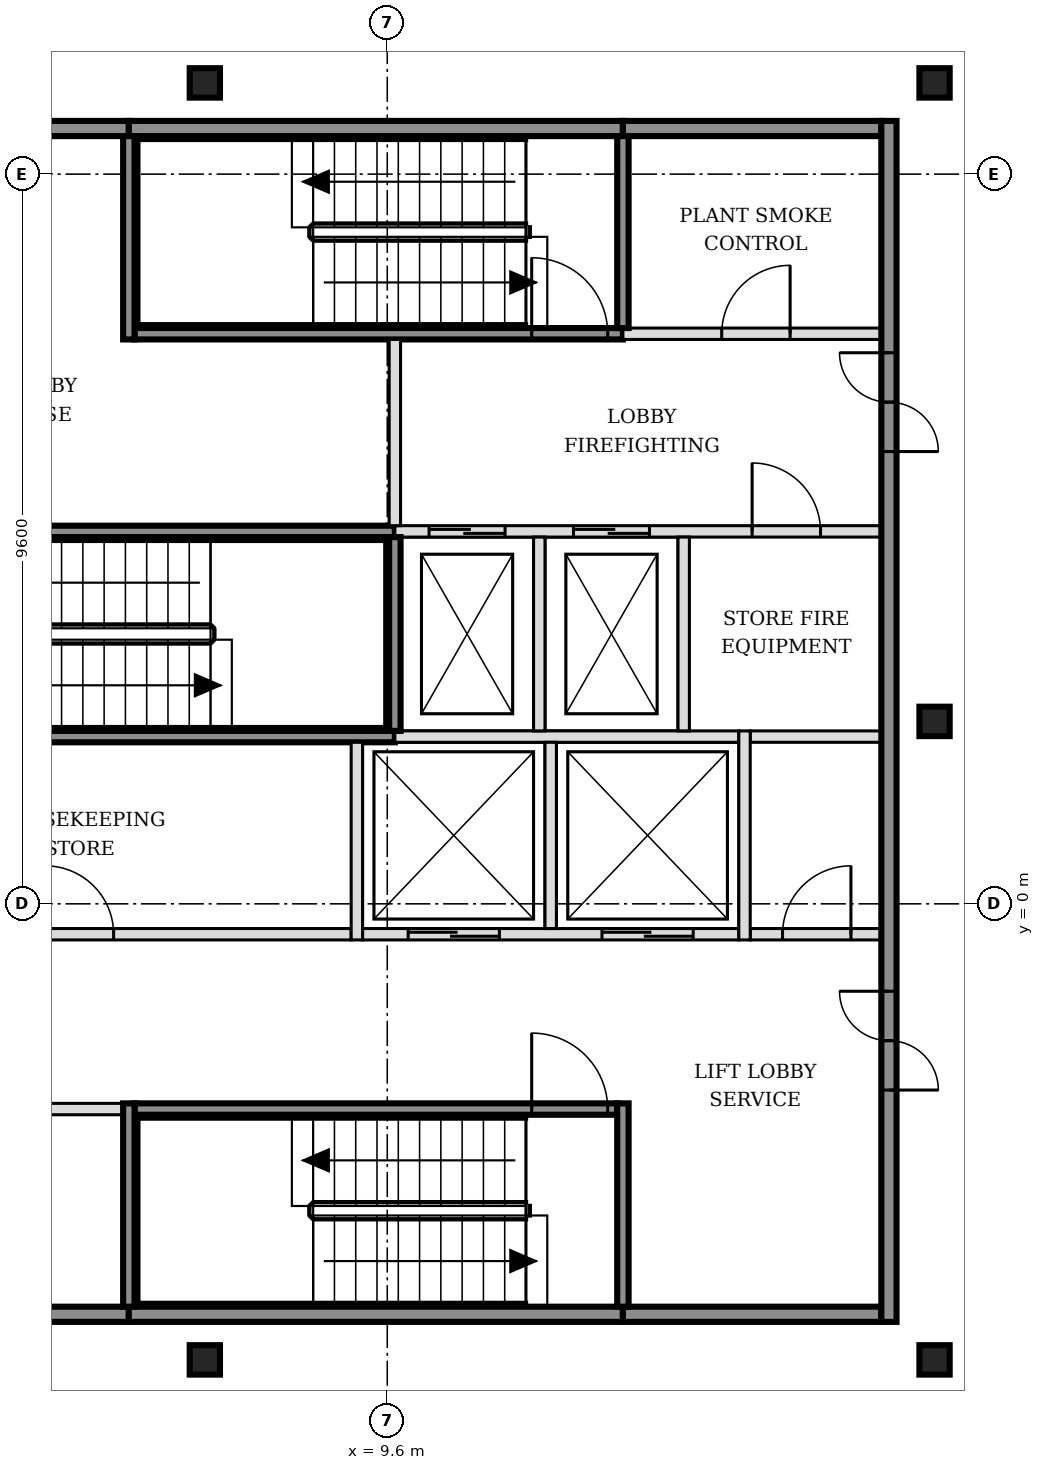
"""IFC4 building model, lengths in metres.
Left out: names, types, materials, properties, quantities, classifications, styles, units other than length and angle.
Written with IfcOpenShell. Run it as: python <this file> out.ifc"""

import sys

from ifc_helpers import new_model, si_unit, direction, frame, frame_2d, origin, origin_2d, place, context, subcontext, project, spatial, rectangle, i_section, extrude, element, fill, save


model = new_model("IFC4")
c1 = context("Model", 3, precision=1e-05, world=origin(), true_north=direction((0.0, 1.0)))
c2 = subcontext(c1, "Body", "Model", "MODEL_VIEW")
j1 = project(units=[si_unit("LENGTHUNIT", "METRE"), si_unit("PLANEANGLEUNIT", "RADIAN")], contexts=[c1])
p1 = place(None, origin())
s1 = spatial("IfcSite", under=j1, at=p1, CompositionType="ELEMENT")
p2 = place(p1, origin())
s2 = spatial("IfcBuilding", under=s1, at=p2, CompositionType="ELEMENT")
p3 = place(p2, frame((0.0, 0.0, 257.4)))
s3 = spatial("IfcBuildingStorey", under=s2, at=p3, CompositionType="ELEMENT", Elevation=257.4)
for number, where, z_axis, x_axis in (
    (1, (7.2, -6.0, -0.15), (0.0, 0.0, 1.0), (1.0, 0.0, 0.0)),
    (2, (16.8, -6.0, -0.15), (0.0, 0.0, 1.0), (1.0, 0.0, 0.0)),
    (3, (16.8, 2.4, -0.15), (0.0, 0.0, 1.0), (1.0, 0.0, 0.0)),
    (4, (7.2, 10.8, -0.15), (0.0, 0.0, 1.0), (1.0, 0.0, 0.0)),
    (5, (16.8, 10.8, -0.15), (0.0, 0.0, 1.0), (1.0, 0.0, 0.0)),
):
    element("IfcColumn", number, at=place(p3, frame(where, z_axis=z_axis, x_axis=x_axis)), inside=s3, PredefinedType="COLUMN", context=c2, shape_type="SweptSolid", body=[
        extrude(i_section(OverallWidth=0.398, OverallDepth=0.387, WebThickness=0.021, FlangeThickness=0.033, FilletRadius=0.015, at=origin_2d()), origin(), (0.0, 0.0, 1.0), 3.5),
    ])
p4 = place(p3, frame((-1.7, -5.4, 0.0), z_axis=(0.0, 0.0, 1.0), x_axis=(1.0, 0.0, 0.0)))
e6 = element("IfcWall", 6, at=p4, inside=s3, PredefinedType="SOLIDWALL", context=c2, shape_type="SweptSolid", body=[
    extrude(rectangle(XDim=7.9, YDim=0.2, at=frame_2d((3.95, 0.0))), origin(), (0.0, 0.0, 1.0), 3.35),
])
p5 = place(p3, frame((6.2, -5.4, 0.0), z_axis=(0.0, 0.0, 1.0), x_axis=(1.0, 0.0, 0.0)))
e7 = element("IfcWall", 7, at=p5, inside=s3, PredefinedType="SOLIDWALL", context=c2, shape_type="SweptSolid", body=[
    extrude(rectangle(XDim=6.5, YDim=0.2, at=frame_2d((3.25, 0.0))), origin(), (0.0, 0.0, 1.0), 3.35),
])
p6 = place(p3, frame((12.7, -5.4, 0.0), z_axis=(0.0, 0.0, 1.0), x_axis=(1.0, 0.0, 0.0)))
e8 = element("IfcWall", 8, at=p6, inside=s3, PredefinedType="SOLIDWALL", context=c2, shape_type="SweptSolid", body=[
    extrude(rectangle(XDim=3.4, YDim=0.2, at=frame_2d((1.7, 0.0))), origin(), (0.0, 0.0, 1.0), 3.35),
])
p7 = place(p3, frame((-1.7, -2.7, 0.0), z_axis=(0.0, 0.0, 1.0), x_axis=(1.0, 0.0, 0.0)))
e9 = element("IfcWall", 9, at=p7, inside=s3, PredefinedType="PARTITIONING", context=c2, shape_type="SweptSolid", body=[
    extrude(rectangle(XDim=7.825, YDim=0.15, at=frame_2d((3.913, 0.0))), origin(), (0.0, 0.0, 1.0), 3.35),
])
p8 = place(p7, frame((3.45, 0.0, 0.0)))
e10 = element("IfcOpeningElement", 10, at=p8, cuts=e9, PredefinedType="OPENING", context=c2, shape_type="SweptSolid", body=[
    extrude(rectangle(XDim=0.9, YDim=2.1, at=frame_2d((0.45, 1.05))), frame((0.0, 0.085, 0.0), z_axis=(0.0, -1.0, 0.0), x_axis=(1.0, 0.0, 0.0)), (0.0, 0.0, 1.0), 0.17),
])
p9 = place(p3, frame((6.275, -2.7, 0.0), z_axis=(0.0, 0.0, 1.0), x_axis=(1.0, 0.0, 0.0)))
e11 = element("IfcWall", 11, at=p9, inside=s3, PredefinedType="SOLIDWALL", context=c2, shape_type="SweptSolid", body=[
    extrude(rectangle(XDim=6.35, YDim=0.15, at=frame_2d((3.175, 0.0))), origin(), (0.0, 0.0, 1.0), 3.35),
])
p10 = place(p9, frame((5.225, 0.0, 0.0)))
e12 = element("IfcOpeningElement", 12, at=p10, cuts=e11, PredefinedType="OPENING", context=c2, shape_type="SweptSolid", body=[
    extrude(rectangle(XDim=1.0, YDim=2.1, at=frame_2d((0.5, 1.05))), frame((0.0, 0.085, 0.0), z_axis=(0.0, -1.0, 0.0), x_axis=(1.0, 0.0, 0.0)), (0.0, 0.0, 1.0), 0.17),
])
p11 = place(p3, frame((-1.7, -0.4, 0.0), z_axis=(0.0, 0.0, 1.0), x_axis=(1.0, 0.0, 0.0)))
e13 = element("IfcWall", 13, at=p11, inside=s3, PredefinedType="PARTITIONING", context=c2, shape_type="SweptSolid", body=[
    extrude(rectangle(XDim=10.825, YDim=0.15, at=frame_2d((5.413, 0.0))), origin(), (0.0, 0.0, 1.0), 3.35),
])
p12 = place(p11, frame((1.3, 0.0, 0.0)))
e14 = element("IfcOpeningElement", 14, at=p12, cuts=e13, PredefinedType="OPENING", context=c2, shape_type="SweptSolid", body=[
    extrude(rectangle(XDim=0.9, YDim=2.1, at=frame_2d((0.45, 1.05))), frame((0.0, 0.085, 0.0), z_axis=(0.0, -1.0, 0.0), x_axis=(1.0, 0.0, 0.0)), (0.0, 0.0, 1.0), 0.17),
])
p13 = place(p11, frame((6.8, 0.0, 0.0)))
e15 = element("IfcOpeningElement", 15, at=p13, cuts=e13, PredefinedType="OPENING", context=c2, shape_type="SweptSolid", body=[
    extrude(rectangle(XDim=0.9, YDim=2.1, at=frame_2d((0.45, 1.05))), frame((0.0, 0.085, 0.0), z_axis=(0.0, -1.0, 0.0), x_axis=(1.0, 0.0, 0.0)), (0.0, 0.0, 1.0), 0.17),
])
p14 = place(p3, frame((9.275, -0.4, 0.0), z_axis=(0.0, 0.0, 1.0), x_axis=(1.0, 0.0, 0.0)))
e16 = element("IfcWall", 16, at=p14, inside=s3, PredefinedType="SOLIDWALL", context=c2, shape_type="SweptSolid", body=[
    extrude(rectangle(XDim=4.95, YDim=0.15, at=frame_2d((2.475, 0.0))), origin(), (0.0, 0.0, 1.0), 3.35),
])
p15 = place(p14, frame((0.6, 0.0, 0.0)))
e17 = element("IfcOpeningElement", 17, at=p15, cuts=e16, PredefinedType="OPENING", context=c2, shape_type="SweptSolid", body=[
    extrude(rectangle(XDim=1.2, YDim=2.1, at=frame_2d((0.6, 1.05))), frame((0.0, 0.085, 0.0), z_axis=(0.0, -1.0, 0.0), x_axis=(1.0, 0.0, 0.0)), (0.0, 0.0, 1.0), 0.17),
])
p16 = place(p14, frame((3.15, 0.0, 0.0)))
e18 = element("IfcOpeningElement", 18, at=p16, cuts=e16, PredefinedType="OPENING", context=c2, shape_type="SweptSolid", body=[
    extrude(rectangle(XDim=1.2, YDim=2.1, at=frame_2d((0.6, 1.05))), frame((0.0, 0.085, 0.0), z_axis=(0.0, -1.0, 0.0), x_axis=(1.0, 0.0, 0.0)), (0.0, 0.0, 1.0), 0.17),
])
p17 = place(p3, frame((14.375, -0.4, 0.0), z_axis=(0.0, 0.0, 1.0), x_axis=(1.0, 0.0, 0.0)))
e19 = element("IfcWall", 19, at=p17, inside=s3, PredefinedType="PARTITIONING", context=c2, shape_type="SweptSolid", body=[
    extrude(rectangle(XDim=1.725, YDim=0.15, at=frame_2d((0.863, 0.0))), origin(), (0.0, 0.0, 1.0), 3.35),
])
p18 = place(p17, frame((0.425, 0.0, 0.0)))
e20 = element("IfcOpeningElement", 20, at=p18, cuts=e19, PredefinedType="OPENING", context=c2, shape_type="SweptSolid", body=[
    extrude(rectangle(XDim=0.9, YDim=2.1, at=frame_2d((0.45, 1.05))), frame((0.0, 0.085, 0.0), z_axis=(0.0, -1.0, 0.0), x_axis=(1.0, 0.0, 0.0)), (0.0, 0.0, 1.0), 0.17),
])
p19 = place(p3, frame((3.2, 2.2, 0.0), z_axis=(0.0, 0.0, 1.0), x_axis=(1.0, 0.0, 0.0)))
e21 = element("IfcWall", 21, at=p19, inside=s3, PredefinedType="SOLIDWALL", context=c2, shape_type="SweptSolid", body=[
    extrude(rectangle(XDim=6.5, YDim=0.15, at=frame_2d((3.25, 0.0))), origin(), (0.0, 0.0, 1.0), 3.35),
])
p20 = place(p3, frame((9.7, 2.2, 0.0), z_axis=(0.0, 0.0, 1.0), x_axis=(1.0, 0.0, 0.0)))
e22 = element("IfcWall", 22, at=p20, inside=s3, PredefinedType="SOLIDWALL", context=c2, shape_type="SweptSolid", body=[
    extrude(rectangle(XDim=4.525, YDim=0.15, at=frame_2d((2.263, 0.0))), origin(), (0.0, 0.0, 1.0), 3.35),
])
p21 = place(p3, frame((14.375, 2.2, 0.0), z_axis=(0.0, 0.0, 1.0), x_axis=(1.0, 0.0, 0.0)))
e23 = element("IfcWall", 23, at=p21, inside=s3, PredefinedType="PARTITIONING", context=c2, shape_type="SweptSolid", body=[
    extrude(rectangle(XDim=1.725, YDim=0.15, at=frame_2d((0.863, 0.0))), origin(), (0.0, 0.0, 1.0), 3.35),
])
p22 = place(p3, frame((3.2, 4.9, 0.0), z_axis=(0.0, 0.0, 1.0), x_axis=(1.0, 0.0, 0.0)))
e24 = element("IfcWall", 24, at=p22, inside=s3, PredefinedType="SOLIDWALL", context=c2, shape_type="SweptSolid", body=[
    extrude(rectangle(XDim=6.5, YDim=0.15, at=frame_2d((3.25, 0.0))), origin(), (0.0, 0.0, 1.0), 3.35),
])
p23 = place(p22, frame((0.175, 0.0, 0.0)))
e25 = element("IfcOpeningElement", 25, at=p23, cuts=e24, PredefinedType="OPENING", context=c2, shape_type="SweptSolid", body=[
    extrude(rectangle(XDim=1.0, YDim=2.1, at=frame_2d((0.5, 1.05))), frame((0.0, 0.085, 0.0), z_axis=(0.0, -1.0, 0.0), x_axis=(1.0, 0.0, 0.0)), (0.0, 0.0, 1.0), 0.17),
])
p24 = place(p3, frame((9.7, 4.9, 0.0), z_axis=(0.0, 0.0, 1.0), x_axis=(1.0, 0.0, 0.0)))
e26 = element("IfcWall", 26, at=p24, inside=s3, PredefinedType="SOLIDWALL", context=c2, shape_type="SweptSolid", body=[
    extrude(rectangle(XDim=6.4, YDim=0.15, at=frame_2d((3.2, 0.0))), origin(), (0.0, 0.0, 1.0), 3.35),
])
p25 = place(p24, frame((0.45, 0.0, 0.0)))
e27 = element("IfcOpeningElement", 27, at=p25, cuts=e26, PredefinedType="OPENING", context=c2, shape_type="SweptSolid", body=[
    extrude(rectangle(XDim=1.0, YDim=2.1, at=frame_2d((0.5, 1.05))), frame((0.0, 0.085, 0.0), z_axis=(0.0, -1.0, 0.0), x_axis=(1.0, 0.0, 0.0)), (0.0, 0.0, 1.0), 0.17),
])
p26 = place(p24, frame((2.35, 0.0, 0.0)))
e28 = element("IfcOpeningElement", 28, at=p26, cuts=e26, PredefinedType="OPENING", context=c2, shape_type="SweptSolid", body=[
    extrude(rectangle(XDim=1.0, YDim=2.1, at=frame_2d((0.5, 1.05))), frame((0.0, 0.085, 0.0), z_axis=(0.0, -1.0, 0.0), x_axis=(1.0, 0.0, 0.0)), (0.0, 0.0, 1.0), 0.17),
])
p27 = place(p24, frame((4.7, 0.0, 0.0)))
e29 = element("IfcOpeningElement", 29, at=p27, cuts=e26, PredefinedType="OPENING", context=c2, shape_type="SweptSolid", body=[
    extrude(rectangle(XDim=0.9, YDim=2.1, at=frame_2d((0.45, 1.05))), frame((0.0, 0.085, 0.0), z_axis=(0.0, -1.0, 0.0), x_axis=(1.0, 0.0, 0.0)), (0.0, 0.0, 1.0), 0.17),
])
p28 = place(p3, frame((6.275, 7.5, 0.0), z_axis=(0.0, 0.0, 1.0), x_axis=(1.0, 0.0, 0.0)))
e30 = element("IfcWall", 30, at=p28, inside=s3, PredefinedType="SOLIDWALL", context=c2, shape_type="SweptSolid", body=[
    extrude(rectangle(XDim=6.425, YDim=0.15, at=frame_2d((3.212, 0.0))), origin(), (0.0, 0.0, 1.0), 3.35),
])
p29 = place(p28, frame((5.225, 0.0, 0.0)))
e31 = element("IfcOpeningElement", 31, at=p29, cuts=e30, PredefinedType="OPENING", context=c2, shape_type="SweptSolid", body=[
    extrude(rectangle(XDim=1.0, YDim=2.1, at=frame_2d((0.5, 1.05))), frame((0.0, 0.085, 0.0), z_axis=(0.0, -1.0, 0.0), x_axis=(1.0, 0.0, 0.0)), (0.0, 0.0, 1.0), 0.17),
])
p30 = place(p3, frame((12.7, 7.5, 0.0), z_axis=(0.0, 0.0, 1.0), x_axis=(1.0, 0.0, 0.0)))
e32 = element("IfcWall", 32, at=p30, inside=s3, PredefinedType="SOLIDWALL", context=c2, shape_type="SweptSolid", body=[
    extrude(rectangle(XDim=3.4, YDim=0.15, at=frame_2d((1.7, 0.0))), origin(), (0.0, 0.0, 1.0), 3.35),
])
p31 = place(p30, frame((1.3, 0.0, 0.0)))
e33 = element("IfcOpeningElement", 33, at=p31, cuts=e32, PredefinedType="OPENING", context=c2, shape_type="SweptSolid", body=[
    extrude(rectangle(XDim=0.9, YDim=2.1, at=frame_2d((0.45, 1.05))), frame((0.0, 0.085, 0.0), z_axis=(0.0, -1.0, 0.0), x_axis=(1.0, 0.0, 0.0)), (0.0, 0.0, 1.0), 0.17),
])
p32 = place(p3, frame((-1.7, 10.2, 0.0), z_axis=(0.0, 0.0, 1.0), x_axis=(1.0, 0.0, 0.0)))
e34 = element("IfcWall", 34, at=p32, inside=s3, PredefinedType="SOLIDWALL", context=c2, shape_type="SweptSolid", body=[
    extrude(rectangle(XDim=7.9, YDim=0.2, at=frame_2d((3.95, 0.0))), origin(), (0.0, 0.0, 1.0), 3.35),
])
p33 = place(p3, frame((6.2, 10.2, 0.0), z_axis=(0.0, 0.0, 1.0), x_axis=(1.0, 0.0, 0.0)))
e35 = element("IfcWall", 35, at=p33, inside=s3, PredefinedType="SOLIDWALL", context=c2, shape_type="SweptSolid", body=[
    extrude(rectangle(XDim=6.5, YDim=0.2, at=frame_2d((3.25, 0.0))), origin(), (0.0, 0.0, 1.0), 3.35),
])
p34 = place(p3, frame((12.7, 10.2, 0.0), z_axis=(0.0, 0.0, 1.0), x_axis=(1.0, 0.0, 0.0)))
e36 = element("IfcWall", 36, at=p34, inside=s3, PredefinedType="SOLIDWALL", context=c2, shape_type="SweptSolid", body=[
    extrude(rectangle(XDim=3.4, YDim=0.2, at=frame_2d((1.7, 0.0))), origin(), (0.0, 0.0, 1.0), 3.35),
])
for number, where, z_axis, x_axis in (
    (37, (6.2, -5.3, 0.0), (0.0, 0.0, 1.0), (0.0, 1.0, 0.0)),
    (38, (6.2, 7.425, 0.0), (0.0, 0.0, 1.0), (0.0, 1.0, 0.0)),
):
    element("IfcWall", number, at=place(p3, frame(where, z_axis=z_axis, x_axis=x_axis)), inside=s3, PredefinedType="SOLIDWALL", context=c2, shape_type="SweptSolid", body=[
        extrude(rectangle(XDim=2.675, YDim=0.15, at=frame_2d((1.337, 0.0))), origin(), (0.0, 0.0, 1.0), 3.35),
    ])
p35 = place(p3, frame((9.2, -0.475, 0.0), z_axis=(0.0, 0.0, 1.0), x_axis=(0.0, 1.0, 0.0)))
e39 = element("IfcWall", 39, at=p35, inside=s3, PredefinedType="SOLIDWALL", context=c2, shape_type="SweptSolid", body=[
    extrude(rectangle(XDim=2.6, YDim=0.15, at=frame_2d((1.3, 0.0))), origin(), (0.0, 0.0, 1.0), 3.35),
])
p36 = place(p3, frame((9.7, 2.275, 0.0), z_axis=(0.0, 0.0, 1.0), x_axis=(0.0, 1.0, 0.0)))
e40 = element("IfcWall", 40, at=p36, inside=s3, PredefinedType="SOLIDWALL", context=c2, shape_type="SweptSolid", body=[
    extrude(rectangle(XDim=2.55, YDim=0.15, at=frame_2d((1.275, 0.0))), origin(), (0.0, 0.0, 1.0), 3.35),
])
p37 = place(p3, frame((9.7, 4.975, 0.0), z_axis=(0.0, 0.0, 1.0), x_axis=(0.0, 1.0, 0.0)))
e41 = element("IfcWall", 41, at=p37, inside=s3, PredefinedType="SOLIDWALL", context=c2, shape_type="SweptSolid", body=[
    extrude(rectangle(XDim=2.45, YDim=0.15, at=frame_2d((1.225, 0.0))), origin(), (0.0, 0.0, 1.0), 3.35),
])
p38 = place(p3, frame((11.6, 2.275, 0.0), z_axis=(0.0, 0.0, 1.0), x_axis=(0.0, 1.0, 0.0)))
e42 = element("IfcWall", 42, at=p38, inside=s3, PredefinedType="SOLIDWALL", context=c2, shape_type="SweptSolid", body=[
    extrude(rectangle(XDim=2.55, YDim=0.15, at=frame_2d((1.275, 0.0))), origin(), (0.0, 0.0, 1.0), 3.35),
])
p39 = place(p3, frame((11.75, -0.325, 0.0), z_axis=(0.0, 0.0, 1.0), x_axis=(0.0, 1.0, 0.0)))
e43 = element("IfcWall", 43, at=p39, inside=s3, PredefinedType="SOLIDWALL", context=c2, shape_type="SweptSolid", body=[
    extrude(rectangle(XDim=2.45, YDim=0.15, at=frame_2d((1.225, 0.0))), origin(), (0.0, 0.0, 1.0), 3.35),
])
p40 = place(p3, frame((12.7, -5.3, 0.0), z_axis=(0.0, 0.0, 1.0), x_axis=(0.0, 1.0, 0.0)))
e44 = element("IfcWall", 44, at=p40, inside=s3, PredefinedType="SOLIDWALL", context=c2, shape_type="SweptSolid", body=[
    extrude(rectangle(XDim=2.675, YDim=0.15, at=frame_2d((1.337, 0.0))), origin(), (0.0, 0.0, 1.0), 3.35),
])
p41 = place(p3, frame((12.7, 7.575, 0.0), z_axis=(0.0, 0.0, 1.0), x_axis=(0.0, 1.0, 0.0)))
e45 = element("IfcWall", 45, at=p41, inside=s3, PredefinedType="SOLIDWALL", context=c2, shape_type="SweptSolid", body=[
    extrude(rectangle(XDim=2.525, YDim=0.15, at=frame_2d((1.263, 0.0))), origin(), (0.0, 0.0, 1.0), 3.35),
])
p42 = place(p3, frame((13.5, 2.275, 0.0), z_axis=(0.0, 0.0, 1.0), x_axis=(0.0, 1.0, 0.0)))
e46 = element("IfcWall", 46, at=p42, inside=s3, PredefinedType="SOLIDWALL", context=c2, shape_type="SweptSolid", body=[
    extrude(rectangle(XDim=2.55, YDim=0.15, at=frame_2d((1.275, 0.0))), origin(), (0.0, 0.0, 1.0), 3.35),
])
p43 = place(p3, frame((14.3, -0.475, 0.0), z_axis=(0.0, 0.0, 1.0), x_axis=(0.0, 1.0, 0.0)))
e47 = element("IfcWall", 47, at=p43, inside=s3, PredefinedType="SOLIDWALL", context=c2, shape_type="SweptSolid", body=[
    extrude(rectangle(XDim=2.75, YDim=0.15, at=frame_2d((1.375, 0.0))), origin(), (0.0, 0.0, 1.0), 3.35),
])
p44 = place(p3, frame((16.2, -5.5, 0.0), z_axis=(0.0, 0.0, 1.0), x_axis=(0.0, 1.0, 0.0)))
e48 = element("IfcWall", 48, at=p44, inside=s3, PredefinedType="SOLIDWALL", context=c2, shape_type="SweptSolid", body=[
    extrude(rectangle(XDim=15.8, YDim=0.2, at=frame_2d((7.9, 0.0))), origin(), (0.0, 0.0, 1.0), 3.35),
])
p45 = place(p44, frame((3.05, 0.0, 0.0)))
e49 = element("IfcOpeningElement", 49, at=p45, cuts=e48, PredefinedType="OPENING", context=c2, shape_type="SweptSolid", body=[
    extrude(rectangle(XDim=1.3, YDim=2.1, at=frame_2d((0.65, 1.05))), frame((0.0, 0.11, 0.0), z_axis=(0.0, -1.0, 0.0), x_axis=(1.0, 0.0, 0.0)), (0.0, 0.0, 1.0), 0.22),
])
p46 = place(p44, frame((11.45, 0.0, 0.0)))
e50 = element("IfcOpeningElement", 50, at=p46, cuts=e48, PredefinedType="OPENING", context=c2, shape_type="SweptSolid", body=[
    extrude(rectangle(XDim=1.3, YDim=2.1, at=frame_2d((0.65, 1.05))), frame((0.0, 0.11, 0.0), z_axis=(0.0, -1.0, 0.0), x_axis=(1.0, 0.0, 0.0)), (0.0, 0.0, 1.0), 0.22),
])
p47 = place(p15, origin())
e51 = element("IfcDoor", 51, at=p47, inside=s3, OperationType="DOUBLE_DOOR_SLIDING", PredefinedType="DOOR", context=c2, shape_type="SweptSolid", body=[
    extrude(rectangle(XDim=1.2, YDim=2.1, at=frame_2d((0.6, 1.05))), frame((0.0, 0.025, 0.0), z_axis=(0.0, -1.0, 0.0), x_axis=(1.0, 0.0, 0.0)), (0.0, 0.0, 1.0), 0.05),
])
fill(e17, e51)
p48 = place(p16, origin())
e52 = element("IfcDoor", 52, at=p48, inside=s3, OperationType="DOUBLE_DOOR_SLIDING", PredefinedType="DOOR", context=c2, shape_type="SweptSolid", body=[
    extrude(rectangle(XDim=1.2, YDim=2.1, at=frame_2d((0.6, 1.05))), frame((0.0, 0.025, 0.0), z_axis=(0.0, -1.0, 0.0), x_axis=(1.0, 0.0, 0.0)), (0.0, 0.0, 1.0), 0.05),
])
fill(e18, e52)
p49 = place(p25, origin())
e53 = element("IfcDoor", 53, at=p49, inside=s3, OperationType="DOUBLE_DOOR_SLIDING", PredefinedType="DOOR", context=c2, shape_type="SweptSolid", body=[
    extrude(rectangle(XDim=1.0, YDim=2.1, at=frame_2d((0.5, 1.05))), frame((0.0, 0.025, 0.0), z_axis=(0.0, -1.0, 0.0), x_axis=(1.0, 0.0, 0.0)), (0.0, 0.0, 1.0), 0.05),
])
fill(e27, e53)
p50 = place(p26, origin())
e54 = element("IfcDoor", 54, at=p50, inside=s3, OperationType="DOUBLE_DOOR_SLIDING", PredefinedType="DOOR", context=c2, shape_type="SweptSolid", body=[
    extrude(rectangle(XDim=1.0, YDim=2.1, at=frame_2d((0.5, 1.05))), frame((0.0, 0.025, 0.0), z_axis=(0.0, -1.0, 0.0), x_axis=(1.0, 0.0, 0.0)), (0.0, 0.0, 1.0), 0.05),
])
fill(e28, e54)
p51 = place(p10, origin())
e55 = element("IfcDoor", 55, at=p51, inside=s3, OperationType="SINGLE_SWING_LEFT", PredefinedType="DOOR", context=c2, shape_type="SweptSolid", body=[
    extrude(rectangle(XDim=1.0, YDim=2.1, at=frame_2d((0.5, 1.05))), frame((0.0, 0.025, 0.0), z_axis=(0.0, -1.0, 0.0), x_axis=(1.0, 0.0, 0.0)), (0.0, 0.0, 1.0), 0.05),
])
fill(e12, e55)
p52 = place(p29, origin())
e56 = element("IfcDoor", 56, at=p52, inside=s3, OperationType="SINGLE_SWING_LEFT", PredefinedType="DOOR", context=c2, shape_type="SweptSolid", body=[
    extrude(rectangle(XDim=1.0, YDim=2.1, at=frame_2d((0.5, 1.05))), frame((0.0, 0.025, 0.0), z_axis=(0.0, -1.0, 0.0), x_axis=(1.0, 0.0, 0.0)), (0.0, 0.0, 1.0), 0.05),
])
fill(e31, e56)
p53 = place(p45, origin())
e57 = element("IfcDoor", 57, at=p53, inside=s3, OperationType="DOUBLE_DOOR_SINGLE_SWING", PredefinedType="DOOR", context=c2, shape_type="SweptSolid", body=[
    extrude(rectangle(XDim=1.3, YDim=2.1, at=frame_2d((0.65, 1.05))), frame((0.0, 0.025, 0.0), z_axis=(0.0, -1.0, 0.0), x_axis=(1.0, 0.0, 0.0)), (0.0, 0.0, 1.0), 0.05),
])
fill(e49, e57)
p54 = place(p46, origin())
e58 = element("IfcDoor", 58, at=p54, inside=s3, OperationType="DOUBLE_DOOR_SINGLE_SWING", PredefinedType="DOOR", context=c2, shape_type="SweptSolid", body=[
    extrude(rectangle(XDim=1.3, YDim=2.1, at=frame_2d((0.65, 1.05))), frame((0.0, 0.025, 0.0), z_axis=(0.0, -1.0, 0.0), x_axis=(1.0, 0.0, 0.0)), (0.0, 0.0, 1.0), 0.05),
])
fill(e50, e58)
p55 = place(p18, origin())
e59 = element("IfcDoor", 59, at=p55, inside=s3, OperationType="SINGLE_SWING_RIGHT", PredefinedType="DOOR", context=c2, shape_type="SweptSolid", body=[
    extrude(rectangle(XDim=0.9, YDim=2.1, at=frame_2d((0.45, 1.05))), frame((0.0, 0.025, 0.0), z_axis=(0.0, -1.0, 0.0), x_axis=(1.0, 0.0, 0.0)), (0.0, 0.0, 1.0), 0.05),
])
fill(e20, e59)
p56 = place(p27, origin())
e60 = element("IfcDoor", 60, at=p56, inside=s3, OperationType="SINGLE_SWING_LEFT", PredefinedType="DOOR", context=c2, shape_type="SweptSolid", body=[
    extrude(rectangle(XDim=0.9, YDim=2.1, at=frame_2d((0.45, 1.05))), frame((0.0, 0.025, 0.0), z_axis=(0.0, -1.0, 0.0), x_axis=(1.0, 0.0, 0.0)), (0.0, 0.0, 1.0), 0.05),
])
fill(e29, e60)
p57 = place(p31, origin())
e61 = element("IfcDoor", 61, at=p57, inside=s3, OperationType="SINGLE_SWING_RIGHT", PredefinedType="DOOR", context=c2, shape_type="SweptSolid", body=[
    extrude(rectangle(XDim=0.9, YDim=2.1, at=frame_2d((0.45, 1.05))), frame((0.0, 0.025, 0.0), z_axis=(0.0, -1.0, 0.0), x_axis=(1.0, 0.0, 0.0)), (0.0, 0.0, 1.0), 0.05),
])
fill(e33, e61)
p58 = place(p13, origin())
e62 = element("IfcDoor", 62, at=p58, inside=s3, OperationType="SINGLE_SWING_LEFT", PredefinedType="DOOR", context=c2, shape_type="SweptSolid", body=[
    extrude(rectangle(XDim=0.9, YDim=2.1, at=frame_2d((0.45, 1.05))), frame((0.0, 0.025, 0.0), z_axis=(0.0, -1.0, 0.0), x_axis=(1.0, 0.0, 0.0)), (0.0, 0.0, 1.0), 0.05),
])
fill(e15, e62)
save(model, sys.argv[1])
